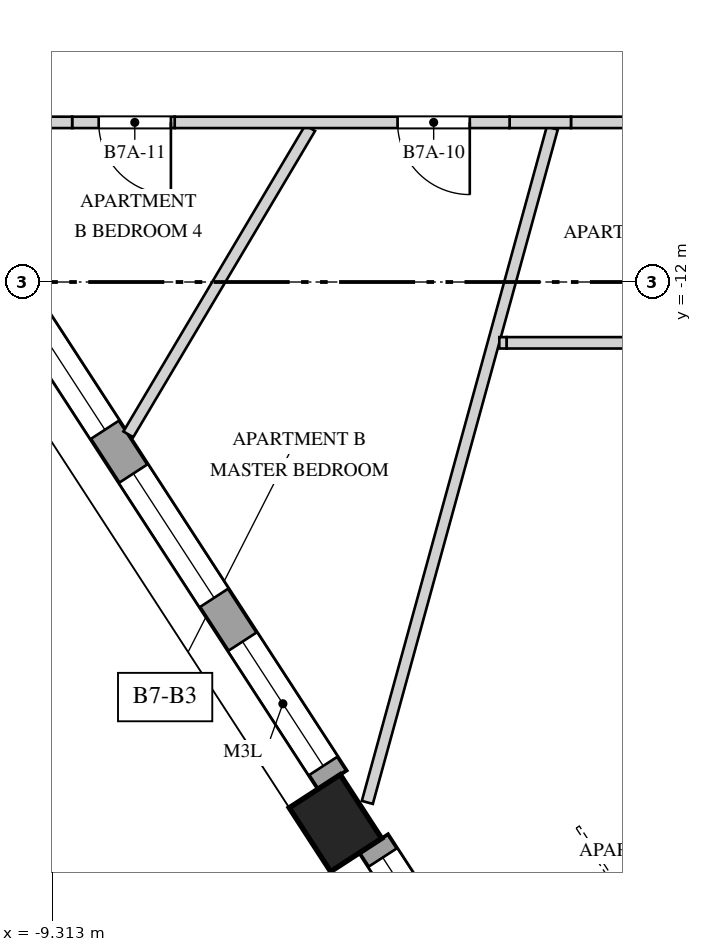
"""IFC4 building model, lengths in metres.
Left out: names, types, materials, properties, quantities, classifications, styles, units other than length and angle.
Written with IfcOpenShell. Run it as: python <this file> out.ifc"""

import sys

from ifc_helpers import new_model, si_unit, direction, frame, frame_2d, origin, origin_2d, place, context, subcontext, project, spatial, polyline, rectangle, outline, extrude, element, fill, save


model = new_model("IFC4")
c1 = context("Model", 3, precision=1e-05, world=origin(), true_north=direction((0.0, 1.0)))
c2 = subcontext(c1, "Body", "Model", "MODEL_VIEW")
j1 = project(units=[si_unit("LENGTHUNIT", "METRE"), si_unit("PLANEANGLEUNIT", "RADIAN")], contexts=[c1])
p1 = place(None, origin())
s1 = spatial("IfcSite", under=j1, at=p1, CompositionType="ELEMENT")
p2 = place(p1, origin())
s2 = spatial("IfcBuilding", under=s1, at=p2, CompositionType="ELEMENT")
p3 = place(p2, frame((0.0, 0.0, 274.4)))
s3 = spatial("IfcBuildingStorey", under=s2, at=p3, CompositionType="ELEMENT", Elevation=274.4)
p4 = place(p3, frame((-5.589, -19.119, -0.35), z_axis=(0.0, 0.0, 1.0), x_axis=(0.544639035015, -0.838670567945, 0.0)))
e1 = element("IfcColumn", 1, at=p4, inside=s3, PredefinedType="COLUMN", context=c2, shape_type="SweptSolid", body=[
    extrude(rectangle(XDim=1.0, YDim=0.8, at=origin_2d()), origin(), (0.0, 0.0, 1.0), 4.35),
])
p5 = place(p3, frame((-9.803, -12.125, 0.0), z_axis=(0.0, 0.0, 1.0), x_axis=(0.544649987904, -0.838663454954, 0.0)))
e2 = element("IfcWall", 2, at=p5, inside=s3, PredefinedType="SOLIDWALL", context=c2, shape_type="SweptSolid", body=[
    extrude(rectangle(XDim=7.66, YDim=0.45, at=frame_2d((3.83, 0.0))), origin(), (0.0, 0.0, 1.0), 3.3),
])
p6 = place(p5, frame((0.218, 0.0, 0.4)))
e3 = element("IfcOpeningElement", 3, at=p6, cuts=e2, PredefinedType="OPENING", context=c2, shape_type="SweptSolid", body=[
    extrude(rectangle(XDim=1.95, YDim=2.75, at=frame_2d((0.975, 1.375))), frame((0.0, 0.235, 0.0), z_axis=(0.0, -1.0, 0.0), x_axis=(1.0, 0.0, 0.0)), (0.0, 0.0, 1.0), 0.47),
])
p7 = place(p5, frame((2.855, 0.0, 0.4)))
e4 = element("IfcOpeningElement", 4, at=p7, cuts=e2, PredefinedType="OPENING", context=c2, shape_type="SweptSolid", body=[
    extrude(rectangle(XDim=1.95, YDim=2.75, at=frame_2d((0.975, 1.375))), frame((0.0, 0.235, 0.0), z_axis=(0.0, -1.0, 0.0), x_axis=(1.0, 0.0, 0.0)), (0.0, 0.0, 1.0), 0.47),
])
p8 = place(p5, frame((5.492, 0.0, 0.4)))
e5 = element("IfcOpeningElement", 5, at=p8, cuts=e2, PredefinedType="OPENING", context=c2, shape_type="SweptSolid", body=[
    extrude(rectangle(XDim=1.95, YDim=2.1, at=frame_2d((0.975, 1.05))), frame((0.0, 0.235, 0.0), z_axis=(0.0, -1.0, 0.0), x_axis=(1.0, 0.0, 0.0)), (0.0, 0.0, 1.0), 0.47),
])
p9 = place(p3, frame((-5.086, -19.388, 0.0), z_axis=(0.0, 0.0, 1.0), x_axis=(0.544675520966, -0.838646872563, 0.0)))
e6 = element("IfcWall", 6, at=p9, inside=s3, PredefinedType="SOLIDWALL", context=c2, shape_type="SweptSolid", body=[
    extrude(rectangle(XDim=2.387, YDim=0.45, at=frame_2d((1.193, 0.0))), origin(), (0.0, 0.0, 1.0), 3.3),
])
p10 = place(p9, frame((0.218, 0.0, 0.4)))
e7 = element("IfcOpeningElement", 7, at=p10, cuts=e6, PredefinedType="OPENING", context=c2, shape_type="SweptSolid", body=[
    extrude(rectangle(XDim=1.95, YDim=2.75, at=frame_2d((0.975, 1.375))), frame((0.0, 0.235, 0.0), z_axis=(0.0, -1.0, 0.0), x_axis=(1.0, 0.0, 0.0)), (0.0, 0.0, 1.0), 0.47),
])
p11 = place(p3, frame((-8.314, -14.004, 0.0), z_axis=(0.0, 0.0, 1.0), x_axis=(0.510490601778, 0.859883332491, 0.0)))
e8 = element("IfcWall", 8, at=p11, inside=s3, PredefinedType="PARTITIONING", context=c2, shape_type="SweptSolid", body=[
    extrude(rectangle(XDim=4.686, YDim=0.15, at=frame_2d((2.343, 0.0))), origin(), (0.0, 0.0, 1.0), 3.65),
])
p12 = place(p3, frame((-5.169, -18.846, 0.0), z_axis=(0.0, 0.0, 1.0), x_axis=(0.264522923164, 0.964379397914, 0.0)))
e9 = element("IfcWall", 9, at=p12, inside=s3, PredefinedType="PARTITIONING", context=c2, shape_type="SweptSolid", body=[
    extrude(rectangle(XDim=9.199, YDim=0.15, at=frame_2d((4.6, 0.0))), origin(), (0.0, 0.0, 1.0), 2.75),
])
p13 = place(p3, frame((-1.602, -9.9, 0.0), z_axis=(0.0, 0.0, 1.0), x_axis=(-1.0, 0.0, 0.0)))
e10 = element("IfcWall", 10, at=p13, inside=s3, PredefinedType="PARTITIONING", context=c2, shape_type="SweptSolid", body=[
    extrude(rectangle(XDim=0.888, YDim=0.15, at=frame_2d((0.444, 0.0))), origin(), (0.0, 0.0, 1.0), 3.65),
])
p14 = place(p3, frame((-2.49, -9.9, 0.0), z_axis=(0.0, 0.0, 1.0), x_axis=(-1.0, 0.0, 0.0)))
e11 = element("IfcWall", 11, at=p14, inside=s3, PredefinedType="PARTITIONING", context=c2, shape_type="SweptSolid", body=[
    extrude(rectangle(XDim=0.807, YDim=0.15, at=frame_2d((0.404, 0.0))), origin(), (0.0, 0.0, 1.0), 2.75),
])
p15 = place(p3, frame((-3.298, -9.9, 0.0), z_axis=(0.0, 0.0, 1.0), x_axis=(-1.0, 0.0, 0.0)))
e12 = element("IfcWall", 12, at=p15, inside=s3, PredefinedType="PARTITIONING", context=c2, shape_type="SweptSolid", body=[
    extrude(rectangle(XDim=4.406, YDim=0.15, at=frame_2d((2.203, 0.0))), origin(), (0.0, 0.0, 1.0), 3.65),
])
p16 = place(p15, frame((0.524, 0.0, 0.0)))
e13 = element("IfcOpeningElement", 13, at=p16, cuts=e12, PredefinedType="OPENING", context=c2, shape_type="SweptSolid", body=[
    extrude(rectangle(XDim=0.95, YDim=2.4, at=frame_2d((0.475, 1.2))), frame((0.0, 0.085, 0.0), z_axis=(0.0, -1.0, 0.0), x_axis=(1.0, 0.0, 0.0)), (0.0, 0.0, 1.0), 0.17),
])
p17 = place(p3, frame((-7.704, -9.9, 0.0), z_axis=(0.0, 0.0, 1.0), x_axis=(-1.0, 0.0, 0.0)))
e14 = element("IfcWall", 14, at=p17, inside=s3, PredefinedType="PARTITIONING", context=c2, shape_type="SweptSolid", body=[
    extrude(outline(polyline([(0.0, 0.0), (1.349, 0.0), (1.349, 2.95), (0.455, 2.95), (0.455, 3.65), (0.0, 3.65), (0.0, 0.0)])), frame((0.0, 0.075, 0.0), z_axis=(0.0, -1.0, 0.0), x_axis=(1.0, 0.0, 0.0)), (0.0, 0.0, 1.0), 0.15),
])
p18 = place(p17, frame((0.05, 0.0, 0.0)))
e15 = element("IfcOpeningElement", 15, at=p18, cuts=e14, PredefinedType="OPENING", context=c2, shape_type="SweptSolid", body=[
    extrude(rectangle(XDim=0.95, YDim=2.4, at=frame_2d((0.475, 1.2))), frame((0.0, 0.085, 0.0), z_axis=(0.0, -1.0, 0.0), x_axis=(1.0, 0.0, 0.0)), (0.0, 0.0, 1.0), 0.17),
])
p19 = place(p3, frame((-9.053, -9.9, 0.0), z_axis=(0.0, 0.0, 1.0), x_axis=(-1.0, 0.0, 0.0)))
e16 = element("IfcWall", 16, at=p19, inside=s3, PredefinedType="PARTITIONING", context=c2, shape_type="SweptSolid", body=[
    extrude(rectangle(XDim=1.57, YDim=0.15, at=frame_2d((0.785, 0.0))), origin(), (0.0, 0.0, 1.0), 3.65),
])
p20 = place(p3, frame((-0.956, -12.8, 0.0), z_axis=(0.0, 0.0, 1.0), x_axis=(-1.0, 0.0, 0.0)))
e17 = element("IfcWall", 17, at=p20, inside=s3, PredefinedType="PARTITIONING", context=c2, shape_type="SweptSolid", body=[
    extrude(rectangle(XDim=2.382, YDim=0.15, at=frame_2d((1.191, 0.0))), origin(), (0.0, 0.0, 1.0), 3.65),
])
p21 = place(p3, frame((-3.338, -12.8, 0.0), z_axis=(0.0, 0.0, 1.0), x_axis=(-1.0, 0.0, 0.0)))
e18 = element("IfcWall", 18, at=p21, inside=s3, PredefinedType="PARTITIONING", context=c2, shape_type="SweptSolid", body=[
    extrude(rectangle(XDim=0.095, YDim=0.15, at=frame_2d((0.047, 0.0))), origin(), (0.0, 0.0, 1.0), 2.75),
])
p22 = place(p6, origin())
e19 = element("IfcWindow", 19, at=p22, inside=s3, PartitioningType="SINGLE_PANEL", PredefinedType="WINDOW", context=c2, shape_type="SweptSolid", body=[
    extrude(rectangle(XDim=1.95, YDim=2.75, at=frame_2d((0.975, 1.375))), frame((0.0, 0.03, 0.0), z_axis=(0.0, -1.0, 0.0), x_axis=(1.0, 0.0, 0.0)), (0.0, 0.0, 1.0), 0.06),
])
fill(e3, e19)
p23 = place(p7, origin())
e20 = element("IfcWindow", 20, at=p23, inside=s3, PartitioningType="SINGLE_PANEL", PredefinedType="WINDOW", context=c2, shape_type="SweptSolid", body=[
    extrude(rectangle(XDim=1.95, YDim=2.75, at=frame_2d((0.975, 1.375))), frame((0.0, 0.03, 0.0), z_axis=(0.0, -1.0, 0.0), x_axis=(1.0, 0.0, 0.0)), (0.0, 0.0, 1.0), 0.06),
])
fill(e4, e20)
p24 = place(p8, origin())
e21 = element("IfcWindow", 21, at=p24, inside=s3, PartitioningType="SINGLE_PANEL", PredefinedType="WINDOW", context=c2, shape_type="SweptSolid", body=[
    extrude(rectangle(XDim=1.95, YDim=2.1, at=frame_2d((0.975, 1.05))), frame((0.0, 0.03, 0.0), z_axis=(0.0, -1.0, 0.0), x_axis=(1.0, 0.0, 0.0)), (0.0, 0.0, 1.0), 0.06),
])
fill(e5, e21)
p25 = place(p10, origin())
e22 = element("IfcWindow", 22, at=p25, inside=s3, PartitioningType="SINGLE_PANEL", PredefinedType="WINDOW", context=c2, shape_type="SweptSolid", body=[
    extrude(rectangle(XDim=1.95, YDim=2.75, at=frame_2d((0.975, 1.375))), frame((0.0, 0.03, 0.0), z_axis=(0.0, -1.0, 0.0), x_axis=(1.0, 0.0, 0.0)), (0.0, 0.0, 1.0), 0.06),
])
fill(e7, e22)
p26 = place(p16, origin())
e23 = element("IfcDoor", 23, at=p26, inside=s3, OperationType="SINGLE_SWING_RIGHT", PredefinedType="DOOR", context=c2, shape_type="SweptSolid", body=[
    extrude(rectangle(XDim=0.95, YDim=2.4, at=frame_2d((0.475, 1.2))), frame((0.0, 0.025, 0.0), z_axis=(0.0, -1.0, 0.0), x_axis=(1.0, 0.0, 0.0)), (0.0, 0.0, 1.0), 0.05),
])
fill(e13, e23)
p27 = place(p18, origin())
e24 = element("IfcDoor", 24, at=p27, inside=s3, OperationType="SINGLE_SWING_LEFT", PredefinedType="DOOR", context=c2, shape_type="SweptSolid", body=[
    extrude(rectangle(XDim=0.95, YDim=2.4, at=frame_2d((0.475, 1.2))), frame((0.0, 0.025, 0.0), z_axis=(0.0, -1.0, 0.0), x_axis=(1.0, 0.0, 0.0)), (0.0, 0.0, 1.0), 0.05),
])
fill(e15, e24)
save(model, sys.argv[1])
